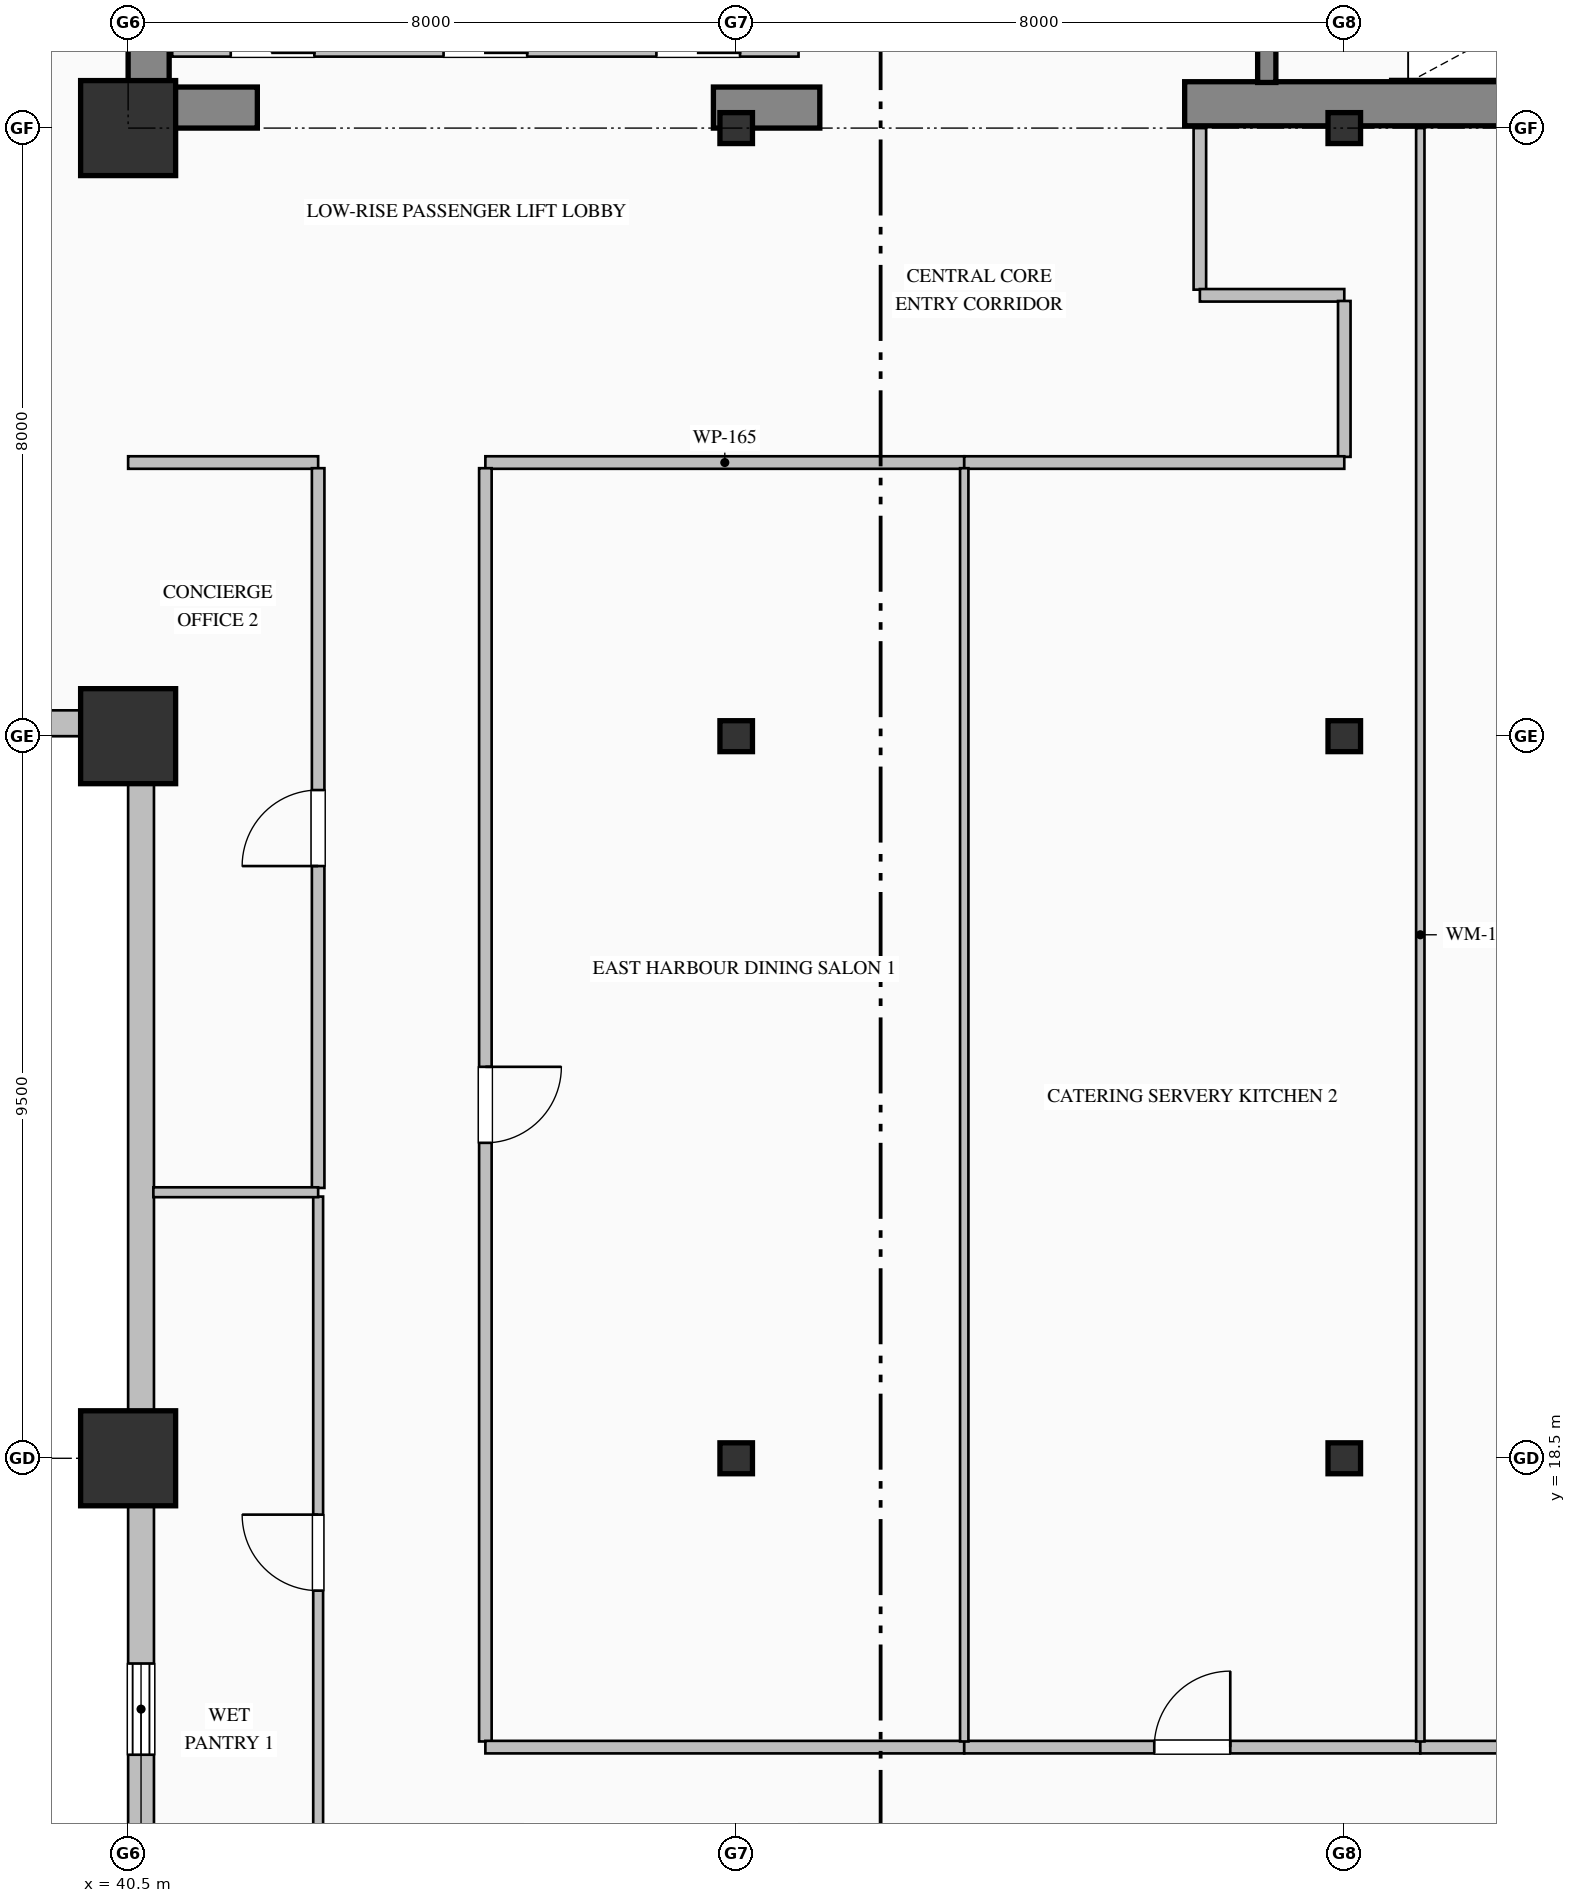
"""IFC4 building model, lengths in metres.
Left out: names, types, materials, properties, quantities, classifications, styles, units other than length and angle.
Written with IfcOpenShell. Run it as: python <this file> out.ifc"""

import sys

from ifc_helpers import new_model, si_unit, direction, frame, frame_2d, origin, origin_2d, place, context, subcontext, project, spatial, rectangle, hollow_rectangle, i_section, extrude, element, fill, save


model = new_model("IFC4")
c1 = context("Model", 3, precision=1e-05, world=origin(), true_north=direction((0.0, 1.0)))
c2 = subcontext(c1, "Body", "Model", "MODEL_VIEW")
j1 = project(units=[si_unit("LENGTHUNIT", "METRE"), si_unit("PLANEANGLEUNIT", "RADIAN")], contexts=[c1])
p1 = place(None, origin())
s1 = spatial("IfcSite", under=j1, at=p1, CompositionType="ELEMENT")
p2 = place(p1, origin())
s2 = spatial("IfcBuilding", under=s1, at=p2, CompositionType="ELEMENT")
p3 = place(p2, frame((0.0, 0.0, 72.2)))
s3 = spatial("IfcBuildingStorey", under=s2, at=p3, CompositionType="ELEMENT", Elevation=72.2)
p4 = place(p3, frame((40.77, 36.54, 0.0), z_axis=(0.0, 0.0, 1.0), x_axis=(0.0, 1.0, 0.0)))
e1 = element("IfcWall", 1, at=p4, inside=s3, PredefinedType="SHEAR", context=c2, shape_type="SweptSolid", body=[
    extrude(rectangle(XDim=7.86, YDim=0.54, at=frame_2d((3.93, 0.0))), origin(), (0.0, 0.0, 1.0), 3.75),
])
p5 = place(p3, frame((40.5, 36.27, 0.0), z_axis=(0.0, 0.0, 1.0), x_axis=(1.0, 0.0, 0.0)))
e2 = element("IfcWall", 2, at=p5, inside=s3, PredefinedType="SHEAR", context=c2, shape_type="SweptSolid", body=[
    extrude(rectangle(XDim=1.7, YDim=0.54, at=frame_2d((0.85, 0.0))), origin(), (0.0, 0.0, 1.0), 3.75),
])
p6 = place(p3, frame((48.2, 36.27, 0.0), z_axis=(0.0, 0.0, 1.0), x_axis=(1.0, 0.0, 0.0)))
e3 = element("IfcWall", 3, at=p6, inside=s3, PredefinedType="SHEAR", context=c2, shape_type="SweptSolid", body=[
    extrude(rectangle(XDim=1.4, YDim=0.54, at=frame_2d((0.7, 0.0))), origin(), (0.0, 0.0, 1.0), 3.75),
])
p7 = place(p3, frame((54.4, 36.32, 0.0), z_axis=(0.0, 0.0, 1.0), x_axis=(1.0, 0.0, 0.0)))
e4 = element("IfcWall", 4, at=p7, inside=s3, PredefinedType="SHEAR", context=c2, shape_type="SweptSolid", body=[
    extrude(rectangle(XDim=9.6, YDim=0.58, at=frame_2d((4.8, 0.0))), origin(), (0.0, 0.0, 1.0), 4.0),
])
for number, where, z_axis, x_axis in (
    (5, (40.5, 18.5, 0.0), (0.0, 0.0, 1.0), (1.0, 0.0, 0.0)),
    (6, (40.5, 28.0, 0.0), (0.0, 0.0, 1.0), (1.0, 0.0, 0.0)),
    (7, (40.5, 36.0, 0.0), (0.0, 0.0, 1.0), (1.0, 0.0, 0.0)),
):
    element("IfcColumn", number, at=place(p3, frame(where, z_axis=z_axis, x_axis=x_axis)), inside=s3, PredefinedType="COLUMN", context=c2, shape_type="SweptSolid", body=[
        extrude(hollow_rectangle(XDim=1.25, YDim=1.25, WallThickness=0.045, at=origin_2d()), origin(), (0.0, 0.0, 1.0), 4.0),
    ])
for number, where, z_axis, x_axis in (
    (8, (48.5, 18.5, 0.0), (0.0, 0.0, 1.0), (1.0, 0.0, 0.0)),
    (9, (48.5, 28.0, 0.0), (0.0, 0.0, 1.0), (1.0, 0.0, 0.0)),
    (10, (48.5, 36.0, 0.0), (0.0, 0.0, 1.0), (1.0, 0.0, 0.0)),
    (11, (56.5, 18.5, 0.0), (0.0, 0.0, 1.0), (1.0, 0.0, 0.0)),
    (12, (56.5, 28.0, 0.0), (0.0, 0.0, 1.0), (1.0, 0.0, 0.0)),
    (13, (56.5, 36.0, 0.0), (0.0, 0.0, 1.0), (1.0, 0.0, 0.0)),
):
    element("IfcColumn", number, at=place(p3, frame(where, z_axis=z_axis, x_axis=x_axis)), inside=s3, PredefinedType="COLUMN", context=c2, shape_type="SweptSolid", body=[
        extrude(i_section(OverallWidth=0.407, OverallDepth=0.428, WebThickness=0.02, FlangeThickness=0.035, FilletRadius=0.022, at=origin_2d()), origin(), (0.0, 0.0, 1.0), 4.0),
    ])
p8 = place(p3, frame((40.67, 8.0, 0.0), z_axis=(0.0, 0.0, 1.0), x_axis=(0.0, 1.0, 0.0)))
e14 = element("IfcWall", 14, at=p8, inside=s3, PredefinedType="SOLIDWALL", context=c2, shape_type="SweptSolid", body=[
    extrude(rectangle(XDim=20.34, YDim=0.34, at=frame_2d((10.17, 0.0))), origin(), (0.0, 0.0, 1.0), 3.05),
])
p9 = place(p8, frame((6.6, 0.0, 0.7)))
e15 = element("IfcOpeningElement", 15, at=p9, cuts=e14, PredefinedType="OPENING", context=c2, shape_type="SweptSolid", body=[
    extrude(rectangle(XDim=1.2, YDim=1.85, at=frame_2d((0.6, 0.925))), frame((0.0, 0.18, 0.0), z_axis=(0.0, -1.0, 0.0), x_axis=(1.0, 0.0, 0.0)), (0.0, 0.0, 1.0), 0.36),
])
p10 = place(p3, frame((40.52, 28.17, 0.0), z_axis=(0.0, 0.0, 1.0), x_axis=(-1.0, 0.0, 0.0)))
e16 = element("IfcWall", 16, at=p10, inside=s3, PredefinedType="SOLIDWALL", context=c2, shape_type="SweptSolid", body=[
    extrude(rectangle(XDim=36.52, YDim=0.34, at=frame_2d((18.26, 0.0))), origin(), (0.0, 0.0, 1.0), 3.05),
])
p11 = place(p10, frame((3.0, 0.0, 0.7)))
e17 = element("IfcOpeningElement", 17, at=p11, cuts=e16, PredefinedType="OPENING", context=c2, shape_type="SweptSolid", body=[
    extrude(rectangle(XDim=1.2, YDim=1.85, at=frame_2d((0.6, 0.925))), frame((0.0, 0.18, 0.0), z_axis=(0.0, -1.0, 0.0), x_axis=(1.0, 0.0, 0.0)), (0.0, 0.0, 1.0), 0.36),
])
p12 = place(p10, frame((10.2, 0.0, 0.7)))
e18 = element("IfcOpeningElement", 18, at=p12, cuts=e16, PredefinedType="OPENING", context=c2, shape_type="SweptSolid", body=[
    extrude(rectangle(XDim=1.2, YDim=1.85, at=frame_2d((0.6, 0.925))), frame((0.0, 0.18, 0.0), z_axis=(0.0, -1.0, 0.0), x_axis=(1.0, 0.0, 0.0)), (0.0, 0.0, 1.0), 0.36),
])
p13 = place(p10, frame((13.8, 0.0, 0.7)))
e19 = element("IfcOpeningElement", 19, at=p13, cuts=e16, PredefinedType="OPENING", context=c2, shape_type="SweptSolid", body=[
    extrude(rectangle(XDim=1.2, YDim=1.85, at=frame_2d((0.6, 0.925))), frame((0.0, 0.18, 0.0), z_axis=(0.0, -1.0, 0.0), x_axis=(1.0, 0.0, 0.0)), (0.0, 0.0, 1.0), 0.36),
])
p14 = place(p10, frame((17.4, 0.0, 0.7)))
e20 = element("IfcOpeningElement", 20, at=p14, cuts=e16, PredefinedType="OPENING", context=c2, shape_type="SweptSolid", body=[
    extrude(rectangle(XDim=1.2, YDim=1.85, at=frame_2d((0.6, 0.925))), frame((0.0, 0.18, 0.0), z_axis=(0.0, -1.0, 0.0), x_axis=(1.0, 0.0, 0.0)), (0.0, 0.0, 1.0), 0.36),
])
p15 = place(p10, frame((21.0, 0.0, 0.7)))
e21 = element("IfcOpeningElement", 21, at=p15, cuts=e16, PredefinedType="OPENING", context=c2, shape_type="SweptSolid", body=[
    extrude(rectangle(XDim=1.2, YDim=1.85, at=frame_2d((0.6, 0.925))), frame((0.0, 0.18, 0.0), z_axis=(0.0, -1.0, 0.0), x_axis=(1.0, 0.0, 0.0)), (0.0, 0.0, 1.0), 0.36),
])
p16 = place(p10, frame((28.2, 0.0, 0.7)))
e22 = element("IfcOpeningElement", 22, at=p16, cuts=e16, PredefinedType="OPENING", context=c2, shape_type="SweptSolid", body=[
    extrude(rectangle(XDim=1.2, YDim=1.85, at=frame_2d((0.6, 0.925))), frame((0.0, 0.18, 0.0), z_axis=(0.0, -1.0, 0.0), x_axis=(1.0, 0.0, 0.0)), (0.0, 0.0, 1.0), 0.36),
])
p17 = place(p3, frame((55.48, 39.75, 0.0), z_axis=(0.0, 0.0, 1.0), x_axis=(0.0, -1.0, 0.0)))
e23 = element("IfcWall", 23, at=p17, inside=s3, PredefinedType="SOLIDWALL", context=c2, shape_type="SweptSolid", body=[
    extrude(rectangle(XDim=3.15, YDim=0.24, at=frame_2d((1.575, 0.0))), origin(), (0.0, 0.0, 1.0), 4.0),
])
p18 = place(p17, frame((1.0, 0.0, 0.0)))
e24 = element("IfcOpeningElement", 24, at=p18, cuts=e23, PredefinedType="OPENING", context=c2, shape_type="SweptSolid", body=[
    extrude(rectangle(XDim=1.15, YDim=2.2, at=frame_2d((0.575, 1.1))), frame((0.0, 0.13, 0.0), z_axis=(0.0, -1.0, 0.0), x_axis=(1.0, 0.0, 0.0)), (0.0, 0.0, 1.0), 0.26),
])
p19 = place(p3, frame((49.32, 37.05, 0.0), z_axis=(0.0, 0.0, 1.0), x_axis=(-1.0, 0.0, 0.0)))
e25 = element("IfcWall", 25, at=p19, inside=s3, PredefinedType="PARTITIONING", context=c2, shape_type="SweptSolid", body=[
    extrude(rectangle(XDim=8.24, YDim=0.22, at=frame_2d((4.12, 0.0))), origin(), (0.0, 0.0, 1.0), 3.75),
])
p20 = place(p19, frame((6.37, 0.0, 0.0)))
e26 = element("IfcOpeningElement", 26, at=p20, cuts=e25, PredefinedType="OPENING", context=c2, shape_type="SweptSolid", body=[
    extrude(rectangle(XDim=1.1, YDim=2.2, at=frame_2d((0.55, 1.1))), frame((0.0, 0.12, 0.0), z_axis=(0.0, -1.0, 0.0), x_axis=(1.0, 0.0, 0.0)), (0.0, 0.0, 1.0), 0.24),
])
p21 = place(p19, frame((3.57, 0.0, 0.0)))
e27 = element("IfcOpeningElement", 27, at=p21, cuts=e25, PredefinedType="OPENING", context=c2, shape_type="SweptSolid", body=[
    extrude(rectangle(XDim=1.1, YDim=2.2, at=frame_2d((0.55, 1.1))), frame((0.0, 0.12, 0.0), z_axis=(0.0, -1.0, 0.0), x_axis=(1.0, 0.0, 0.0)), (0.0, 0.0, 1.0), 0.24),
])
p22 = place(p19, frame((0.77, 0.0, 0.0)))
e28 = element("IfcOpeningElement", 28, at=p22, cuts=e25, PredefinedType="OPENING", context=c2, shape_type="SweptSolid", body=[
    extrude(rectangle(XDim=1.1, YDim=2.2, at=frame_2d((0.55, 1.1))), frame((0.0, 0.12, 0.0), z_axis=(0.0, -1.0, 0.0), x_axis=(1.0, 0.0, 0.0)), (0.0, 0.0, 1.0), 0.24),
])
p23 = place(p3, frame((51.5, 31.6, 0.0), z_axis=(0.0, 0.0, 1.0), x_axis=(-1.0, 0.0, 0.0)))
e29 = element("IfcWall", 29, at=p23, inside=s3, PredefinedType="PARTITIONING", context=c2, shape_type="SweptSolid", body=[
    extrude(rectangle(XDim=6.3, YDim=0.165, at=frame_2d((3.15, 0.0))), origin(), (0.0, 0.0, 1.0), 3.75),
])
p24 = place(p3, frame((54.6, 36.0, 0.0), z_axis=(0.0, 0.0, 1.0), x_axis=(0.0, -1.0, 0.0)))
e30 = element("IfcWall", 30, at=p24, inside=s3, PredefinedType="PARTITIONING", context=c2, shape_type="SweptSolid", body=[
    extrude(rectangle(XDim=2.125, YDim=0.165, at=frame_2d((1.063, 0.0))), origin(), (0.0, 0.0, 1.0), 3.75),
])
p25 = place(p3, frame((54.6, 33.8, 0.0), z_axis=(0.0, 0.0, 1.0), x_axis=(1.0, 0.0, 0.0)))
e31 = element("IfcWall", 31, at=p25, inside=s3, PredefinedType="PARTITIONING", context=c2, shape_type="SweptSolid", body=[
    extrude(rectangle(XDim=1.9, YDim=0.165, at=frame_2d((0.95, 0.0))), origin(), (0.0, 0.0, 1.0), 3.75),
])
p26 = place(p3, frame((56.5, 33.726, 0.0), z_axis=(0.0, 0.0, 1.0), x_axis=(0.0, -1.0, 0.0)))
e32 = element("IfcWall", 32, at=p26, inside=s3, PredefinedType="PARTITIONING", context=c2, shape_type="SweptSolid", body=[
    extrude(rectangle(XDim=2.051, YDim=0.165, at=frame_2d((1.025, 0.0))), origin(), (0.0, 0.0, 1.0), 3.042),
])
p27 = place(p3, frame((56.5, 31.6, 0.0), z_axis=(0.0, 0.0, 1.0), x_axis=(-1.0, 0.0, 0.0)))
e33 = element("IfcWall", 33, at=p27, inside=s3, PredefinedType="PARTITIONING", context=c2, shape_type="SweptSolid", body=[
    extrude(rectangle(XDim=5.0, YDim=0.165, at=frame_2d((2.5, 0.0))), origin(), (0.0, 0.0, 1.0), 3.75),
])
p28 = place(p3, frame((43.0, 31.6, 0.0), z_axis=(0.0, 0.0, 1.0), x_axis=(-1.0, 0.0, 0.0)))
e34 = element("IfcWall", 34, at=p28, inside=s3, PredefinedType="PARTITIONING", context=c2, shape_type="SweptSolid", body=[
    extrude(rectangle(XDim=2.5, YDim=0.165, at=frame_2d((1.25, 0.0))), origin(), (0.0, 0.0, 1.0), 3.75),
])
p29 = place(p3, frame((45.2, 31.525, 0.0), z_axis=(0.0, 0.0, 1.0), x_axis=(0.0, -1.0, 0.0)))
e35 = element("IfcWall", 35, at=p29, inside=s3, PredefinedType="PARTITIONING", context=c2, shape_type="SweptSolid", body=[
    extrude(rectangle(XDim=16.751, YDim=0.165, at=frame_2d((8.375, 0.0))), origin(), (0.0, 0.0, 1.0), 3.75),
])
p30 = place(p29, frame((7.875, 0.0, 0.0)))
e36 = element("IfcOpeningElement", 36, at=p30, cuts=e35, PredefinedType="OPENING", context=c2, shape_type="SweptSolid", body=[
    extrude(rectangle(XDim=1.0, YDim=2.15, at=frame_2d((0.5, 1.075))), frame((0.0, 0.093, 0.0), z_axis=(0.0, -1.0, 0.0), x_axis=(1.0, 0.0, 0.0)), (0.0, 0.0, 1.0), 0.185),
])
p31 = place(p3, frame((43.0, 12.574, 0.0), z_axis=(0.0, 0.0, 1.0), x_axis=(0.0, 1.0, 0.0)))
e37 = element("IfcWall", 37, at=p31, inside=s3, PredefinedType="PARTITIONING", context=c2, shape_type="SweptSolid", body=[
    extrude(rectangle(XDim=9.369, YDim=0.13, at=frame_2d((4.684, 0.0))), origin(), (0.0, 0.0, 1.0), 3.75),
])
p32 = place(p31, frame((4.184, 0.0, 0.0)))
e38 = element("IfcOpeningElement", 38, at=p32, cuts=e37, PredefinedType="OPENING", context=c2, shape_type="SweptSolid", body=[
    extrude(rectangle(XDim=1.0, YDim=2.15, at=frame_2d((0.5, 1.075))), frame((0.0, 0.075, 0.0), z_axis=(0.0, -1.0, 0.0), x_axis=(1.0, 0.0, 0.0)), (0.0, 0.0, 1.0), 0.15),
])
p33 = place(p3, frame((43.0, 22.057, 0.0), z_axis=(0.0, 0.0, 1.0), x_axis=(0.0, 1.0, 0.0)))
e39 = element("IfcWall", 39, at=p33, inside=s3, PredefinedType="PARTITIONING", context=c2, shape_type="SweptSolid", body=[
    extrude(rectangle(XDim=9.469, YDim=0.165, at=frame_2d((4.734, 0.0))), origin(), (0.0, 0.0, 1.0), 3.75),
])
p34 = place(p33, frame((4.234, 0.0, 0.0)))
e40 = element("IfcOpeningElement", 40, at=p34, cuts=e39, PredefinedType="OPENING", context=c2, shape_type="SweptSolid", body=[
    extrude(rectangle(XDim=1.0, YDim=2.15, at=frame_2d((0.5, 1.075))), frame((0.0, 0.093, 0.0), z_axis=(0.0, -1.0, 0.0), x_axis=(1.0, 0.0, 0.0)), (0.0, 0.0, 1.0), 0.185),
])
p35 = place(p3, frame((45.2, 14.7, 0.0), z_axis=(0.0, 0.0, 1.0), x_axis=(1.0, 0.0, 0.0)))
e41 = element("IfcWall", 41, at=p35, inside=s3, PredefinedType="PARTITIONING", context=c2, shape_type="SweptSolid", body=[
    extrude(rectangle(XDim=6.3, YDim=0.165, at=frame_2d((3.15, 0.0))), origin(), (0.0, 0.0, 1.0), 3.75),
])
p36 = place(p3, frame((51.5, 14.7, 0.0), z_axis=(0.0, 0.0, 1.0), x_axis=(1.0, 0.0, 0.0)))
e42 = element("IfcWall", 42, at=p36, inside=s3, PredefinedType="PARTITIONING", context=c2, shape_type="SweptSolid", body=[
    extrude(rectangle(XDim=6.0, YDim=0.165, at=frame_2d((3.0, 0.0))), origin(), (0.0, 0.0, 1.0), 3.75),
])
p37 = place(p36, frame((2.5, 0.0, 0.0)))
e43 = element("IfcOpeningElement", 43, at=p37, cuts=e42, PredefinedType="OPENING", context=c2, shape_type="SweptSolid", body=[
    extrude(rectangle(XDim=1.0, YDim=2.15, at=frame_2d((0.5, 1.075))), frame((0.0, 0.093, 0.0), z_axis=(0.0, -1.0, 0.0), x_axis=(1.0, 0.0, 0.0)), (0.0, 0.0, 1.0), 0.185),
])
p38 = place(p3, frame((57.5, 14.7, 0.0), z_axis=(0.0, 0.0, 1.0), x_axis=(1.0, 0.0, 0.0)))
e44 = element("IfcWall", 44, at=p38, inside=s3, PredefinedType="PARTITIONING", context=c2, shape_type="SweptSolid", body=[
    extrude(rectangle(XDim=4.0, YDim=0.165, at=frame_2d((2.0, 0.0))), origin(), (0.0, 0.0, 1.0), 3.75),
])
p39 = place(p38, frame((1.5, 0.0, 0.0)))
e45 = element("IfcOpeningElement", 45, at=p39, cuts=e44, PredefinedType="OPENING", context=c2, shape_type="SweptSolid", body=[
    extrude(rectangle(XDim=1.0, YDim=2.15, at=frame_2d((0.5, 1.075))), frame((0.0, 0.093, 0.0), z_axis=(0.0, -1.0, 0.0), x_axis=(1.0, 0.0, 0.0)), (0.0, 0.0, 1.0), 0.185),
])
p40 = place(p3, frame((51.5, 31.525, 0.0), z_axis=(0.0, 0.0, 1.0), x_axis=(0.0, -1.0, 0.0)))
e46 = element("IfcWall", 46, at=p40, inside=s3, PredefinedType="MOVABLE", context=c2, shape_type="SweptSolid", body=[
    extrude(rectangle(XDim=16.751, YDim=0.11, at=frame_2d((8.375, 0.0))), origin(), (0.0, 0.0, 1.0), 3.75),
])
p41 = place(p3, frame((57.5, 36.0, 0.0), z_axis=(0.0, 0.0, 1.0), x_axis=(0.0, -1.0, 0.0)))
e47 = element("IfcWall", 47, at=p41, inside=s3, PredefinedType="MOVABLE", context=c2, shape_type="SweptSolid", body=[
    extrude(rectangle(XDim=21.226, YDim=0.11, at=frame_2d((10.613, 0.0))), origin(), (0.0, 0.0, 1.0), 3.75),
])
p42 = place(p3, frame((40.832, 22.0, 0.0), z_axis=(0.0, 0.0, 1.0), x_axis=(1.0, 0.0, 0.0)))
e48 = element("IfcWall", 48, at=p42, inside=s3, PredefinedType="PARTITIONING", context=c2, shape_type="SweptSolid", body=[
    extrude(rectangle(XDim=2.168, YDim=0.13, at=frame_2d((1.084, 0.0))), origin(), (0.0, 0.0, 1.0), 3.75),
])
p43 = place(p9, origin())
e49 = element("IfcWindow", 49, at=p43, inside=s3, PartitioningType="DOUBLE_PANEL_VERTICAL", PredefinedType="WINDOW", context=c2, shape_type="SweptSolid", body=[
    extrude(rectangle(XDim=1.2, YDim=1.85, at=frame_2d((0.6, 0.925))), frame((0.0, 0.15, 0.0), z_axis=(0.0, -1.0, 0.0), x_axis=(1.0, 0.0, 0.0)), (0.0, 0.0, 1.0), 0.06),
])
fill(e15, e49)
p44 = place(p30, origin())
e50 = element("IfcDoor", 50, at=p44, inside=s3, OperationType="SINGLE_SWING_LEFT", PredefinedType="DOOR", context=c2, shape_type="SweptSolid", body=[
    extrude(rectangle(XDim=1.0, YDim=2.15, at=frame_2d((0.5, 1.075))), frame((0.0, 0.025, 0.0), z_axis=(0.0, -1.0, 0.0), x_axis=(1.0, 0.0, 0.0)), (0.0, 0.0, 1.0), 0.05),
])
fill(e36, e50)
p45 = place(p37, origin())
e51 = element("IfcDoor", 51, at=p45, inside=s3, OperationType="SINGLE_SWING_RIGHT", PredefinedType="DOOR", context=c2, shape_type="SweptSolid", body=[
    extrude(rectangle(XDim=1.0, YDim=2.15, at=frame_2d((0.5, 1.075))), frame((0.0, 0.025, 0.0), z_axis=(0.0, -1.0, 0.0), x_axis=(1.0, 0.0, 0.0)), (0.0, 0.0, 1.0), 0.05),
])
fill(e43, e51)
p46 = place(p32, origin())
e52 = element("IfcDoor", 52, at=p46, inside=s3, OperationType="SINGLE_SWING_RIGHT", PredefinedType="DOOR", context=c2, shape_type="SweptSolid", body=[
    extrude(rectangle(XDim=1.0, YDim=2.15, at=frame_2d((0.5, 1.075))), frame((0.0, 0.025, 0.0), z_axis=(0.0, -1.0, 0.0), x_axis=(1.0, 0.0, 0.0)), (0.0, 0.0, 1.0), 0.05),
])
fill(e38, e52)
p47 = place(p34, origin())
e53 = element("IfcDoor", 53, at=p47, inside=s3, OperationType="SINGLE_SWING_LEFT", PredefinedType="DOOR", context=c2, shape_type="SweptSolid", body=[
    extrude(rectangle(XDim=1.0, YDim=2.15, at=frame_2d((0.5, 1.075))), frame((0.0, 0.025, 0.0), z_axis=(0.0, -1.0, 0.0), x_axis=(1.0, 0.0, 0.0)), (0.0, 0.0, 1.0), 0.05),
])
fill(e40, e53)
save(model, sys.argv[1])
